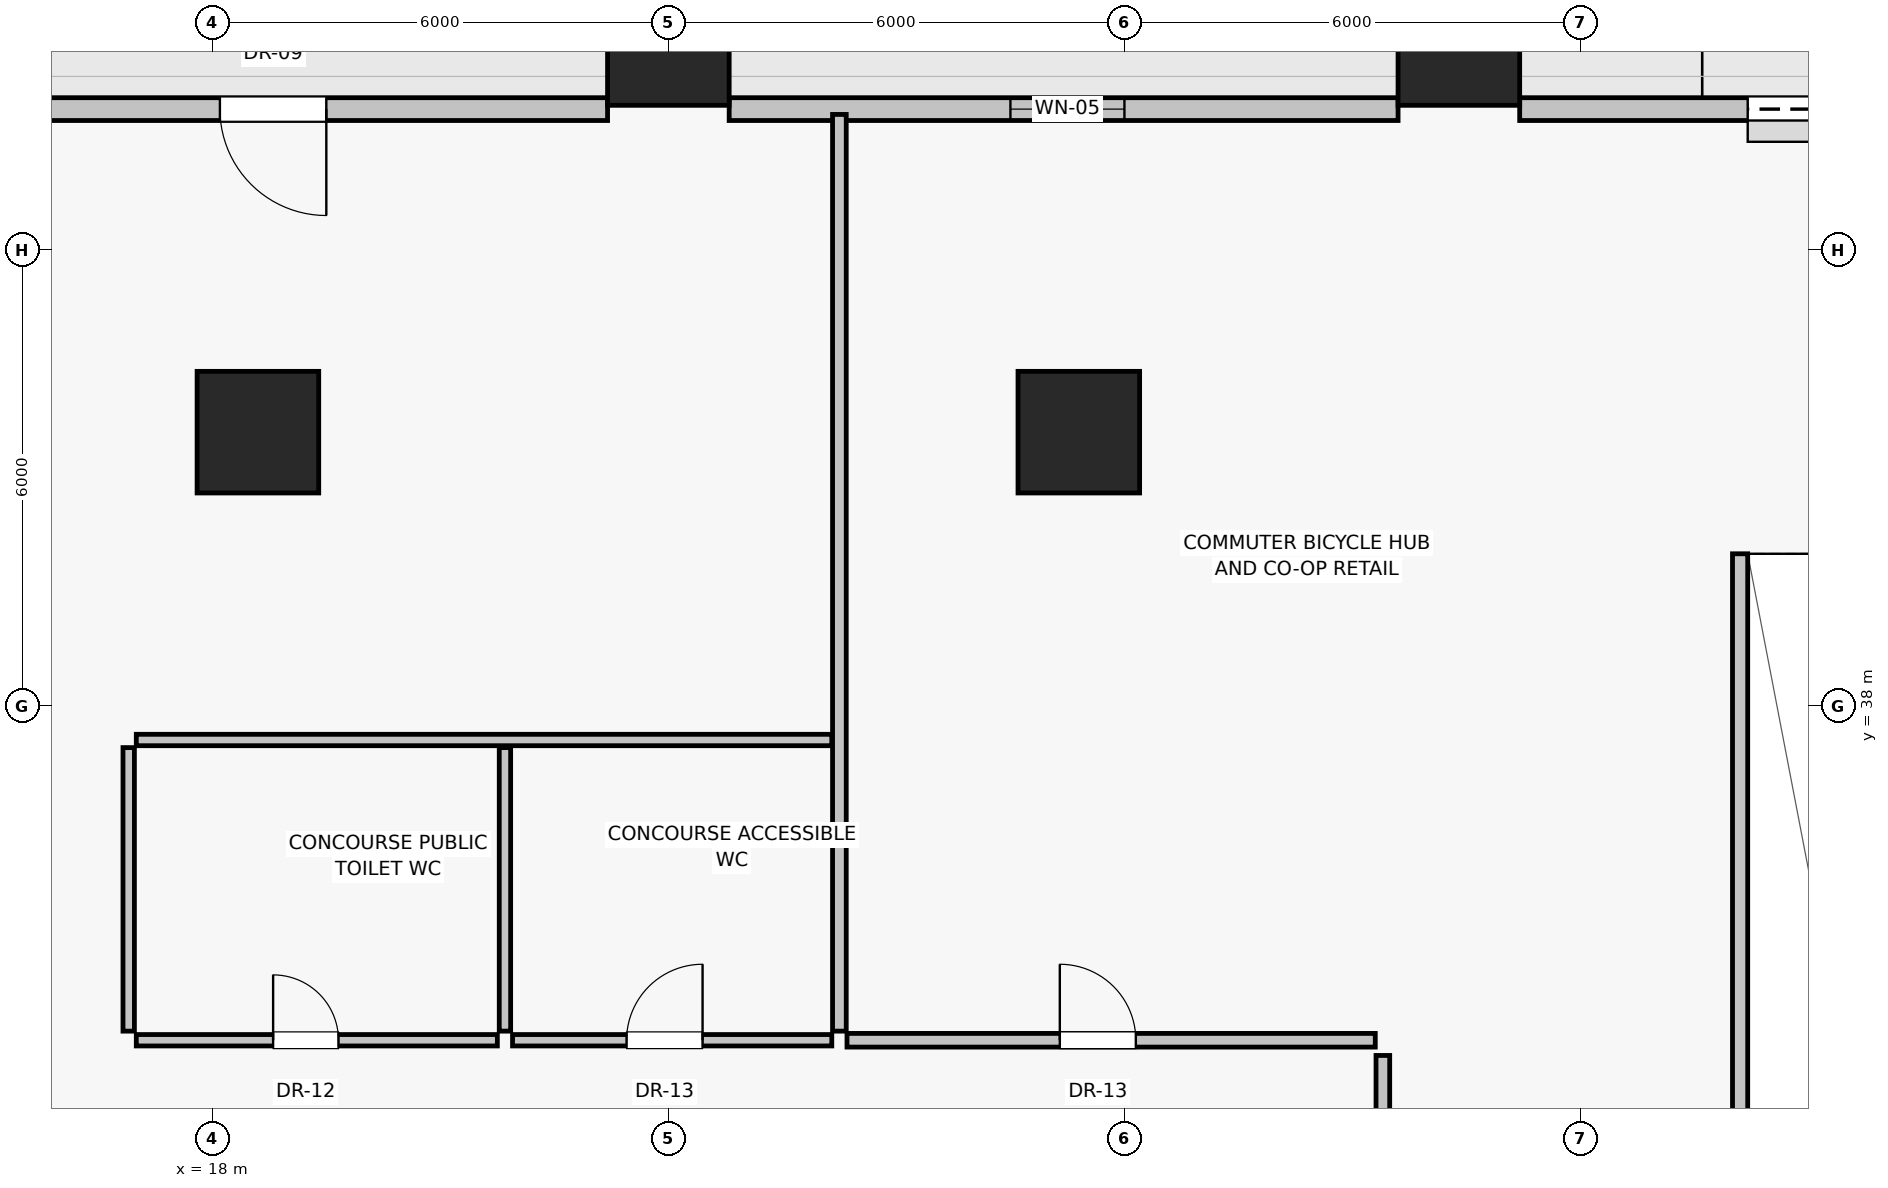
"""IFC4 building model, lengths in metres.
Left out: names, types, materials, properties, quantities, classifications, styles, units other than length and angle.
Written with IfcOpenShell. Run it as: python <this file> out.ifc"""

import sys

from ifc_helpers import new_model, si_unit, direction, frame, frame_2d, origin, origin_2d, place, context, subcontext, project, spatial, rectangle, extrude, source, transform, mapped, element, fill, save


model = new_model("IFC4")
c1 = context("Model", 3, precision=1e-05, world=origin(), true_north=direction((0.0, 1.0)))
c2 = subcontext(c1, "Body", "Model", "MODEL_VIEW")
j1 = project(units=[si_unit("LENGTHUNIT", "METRE"), si_unit("PLANEANGLEUNIT", "RADIAN")], contexts=[c1])
p1 = place(None, origin())
s1 = spatial("IfcSite", under=j1, at=p1, CompositionType="ELEMENT")
p2 = place(p1, origin())
s2 = spatial("IfcBuilding", under=s1, at=p2, CompositionType="ELEMENT")
p3 = place(p2, origin())
s3 = spatial("IfcBuildingStorey", under=s2, at=p3, CompositionType="ELEMENT", Elevation=0.0)
for number, where, z_axis, x_axis in (
    (1, (24.0, 46.7, 0.0), (0.0, 0.0, 1.0), (1.0, 0.0, 0.0)),
    (2, (34.4, 46.7, 0.0), (0.0, 0.0, 1.0), (1.0, 0.0, 0.0)),
    (3, (29.4, 41.6, 0.0), (0.0, 0.0, 1.0), (1.0, 0.0, 0.0)),
    (4, (18.6, 41.6, 0.0), (0.0, 0.0, 1.0), (1.0, 0.0, 0.0)),
):
    element("IfcColumn", number, at=place(p3, frame(where, z_axis=z_axis, x_axis=x_axis)), inside=s3, PredefinedType="COLUMN", context=c2, shape_type="SweptSolid", body=[
        extrude(rectangle(XDim=1.6, YDim=1.6, at=origin_2d()), origin(), (0.0, 0.0, 1.0), 5.2),
    ])
p4 = place(p3, frame((46.0, 45.85, 0.0), z_axis=(0.0, 0.0, 1.0), x_axis=(-1.0, 0.0, 0.0)))
e5 = element("IfcWall", 5, at=p4, inside=s3, PredefinedType="SOLIDWALL", context=c2, shape_type="SweptSolid", body=[
    extrude(rectangle(XDim=10.8, YDim=0.3, at=frame_2d((5.4, 0.0))), origin(), (0.0, 0.0, 1.0), 4.9),
])
p5 = place(p4, frame((1.3, 0.0, 0.0)))
e6 = element("IfcOpeningElement", 6, at=p5, cuts=e5, PredefinedType="OPENING", context=c2, shape_type="SweptSolid", body=[
    extrude(rectangle(XDim=6.5, YDim=4.2, at=frame_2d((3.25, 2.1))), frame((0.0, 0.16, 0.0), z_axis=(0.0, -1.0, 0.0), x_axis=(1.0, 0.0, 0.0)), (0.0, 0.0, 1.0), 0.32),
])
p6 = place(p3, frame((33.6, 45.85, 0.0), z_axis=(0.0, 0.0, 1.0), x_axis=(-1.0, 0.0, 0.0)))
e7 = element("IfcWall", 7, at=p6, inside=s3, PredefinedType="SOLIDWALL", context=c2, shape_type="SweptSolid", body=[
    extrude(rectangle(XDim=8.8, YDim=0.3, at=frame_2d((4.4, 0.0))), origin(), (0.0, 0.0, 1.0), 3.8),
])
p7 = place(p6, frame((3.6, 0.0, 0.85)))
e8 = element("IfcOpeningElement", 8, at=p7, cuts=e7, PredefinedType="OPENING", context=c2, shape_type="SweptSolid", body=[
    extrude(rectangle(XDim=1.5, YDim=1.6, at=frame_2d((0.75, 0.8))), frame((0.0, 0.16, 0.0), z_axis=(0.0, -1.0, 0.0), x_axis=(1.0, 0.0, 0.0)), (0.0, 0.0, 1.0), 0.32),
])
p8 = place(p3, frame((23.2, 45.85, 0.0), z_axis=(0.0, 0.0, 1.0), x_axis=(-1.0, 0.0, 0.0)))
e9 = element("IfcWall", 9, at=p8, inside=s3, PredefinedType="SOLIDWALL", context=c2, shape_type="SweptSolid", body=[
    extrude(rectangle(XDim=8.8, YDim=0.3, at=frame_2d((4.4, 0.0))), origin(), (0.0, 0.0, 1.0), 3.8),
])
p9 = place(p8, frame((3.7, 0.0, 0.0)))
e10 = element("IfcOpeningElement", 10, at=p9, cuts=e9, PredefinedType="OPENING", context=c2, shape_type="SweptSolid", body=[
    extrude(rectangle(XDim=1.4, YDim=2.3, at=frame_2d((0.7, 1.15))), frame((0.0, 0.16, 0.0), z_axis=(0.0, -1.0, 0.0), x_axis=(1.0, 0.0, 0.0)), (0.0, 0.0, 1.0), 0.32),
])
p10 = place(p3, frame((38.1, 6.2, 0.0), z_axis=(0.0, 0.0, 1.0), x_axis=(0.0, 1.0, 0.0)))
e11 = element("IfcWall", 11, at=p10, inside=s3, PredefinedType="SOLIDWALL", context=c2, shape_type="SweptSolid", body=[
    extrude(rectangle(XDim=33.8, YDim=0.2, at=frame_2d((16.9, 0.0))), origin(), (0.0, 0.0, 1.0), 4.9),
])
p11 = place(p3, frame((33.4, 15.4, 0.0), z_axis=(0.0, 0.0, 1.0), x_axis=(0.0, 1.0, 0.0)))
e12 = element("IfcWall", 12, at=p11, inside=s3, PredefinedType="PARTITIONING", context=c2, shape_type="SweptSolid", body=[
    extrude(rectangle(XDim=18.0, YDim=0.18, at=frame_2d((9.0, 0.0))), origin(), (0.0, 0.0, 1.0), 4.9),
])
p12 = place(p11, frame((7.5, 0.0, 0.0)))
e13 = element("IfcOpeningElement", 13, at=p12, cuts=e12, PredefinedType="OPENING", context=c2, shape_type="SweptSolid", body=[
    extrude(rectangle(XDim=1.8, YDim=2.25, at=frame_2d((0.9, 1.125))), frame((0.0, 0.1, 0.0), z_axis=(0.0, -1.0, 0.0), x_axis=(1.0, 0.0, 0.0)), (0.0, 0.0, 1.0), 0.2),
])
p13 = place(p3, frame((17.0, 33.6, 0.0), z_axis=(0.0, 0.0, 1.0), x_axis=(1.0, 0.0, 0.0)))
e14 = element("IfcWall", 14, at=p13, inside=s3, PredefinedType="PARTITIONING", context=c2, shape_type="SweptSolid", body=[
    extrude(rectangle(XDim=4.75, YDim=0.15, at=frame_2d((2.375, 0.0))), origin(), (0.0, 0.0, 1.0), 4.9),
])
p14 = place(p13, frame((1.8, 0.0, 0.0)))
e15 = element("IfcOpeningElement", 15, at=p14, cuts=e14, PredefinedType="OPENING", context=c2, shape_type="SweptSolid", body=[
    extrude(rectangle(XDim=0.86, YDim=2.01, at=frame_2d((0.43, 1.005))), frame((0.0, 0.085, 0.0), z_axis=(0.0, -1.0, 0.0), x_axis=(1.0, 0.0, 0.0)), (0.0, 0.0, 1.0), 0.17),
])
p15 = place(p3, frame((21.95, 33.6, 0.0), z_axis=(0.0, 0.0, 1.0), x_axis=(1.0, 0.0, 0.0)))
e16 = element("IfcWall", 16, at=p15, inside=s3, PredefinedType="PARTITIONING", context=c2, shape_type="SweptSolid", body=[
    extrude(rectangle(XDim=4.2, YDim=0.15, at=frame_2d((2.1, 0.0))), origin(), (0.0, 0.0, 1.0), 4.9),
])
p16 = place(p15, frame((1.5, 0.0, 0.0)))
e17 = element("IfcOpeningElement", 17, at=p16, cuts=e16, PredefinedType="OPENING", context=c2, shape_type="SweptSolid", body=[
    extrude(rectangle(XDim=1.0, YDim=2.01, at=frame_2d((0.5, 1.005))), frame((0.0, 0.085, 0.0), z_axis=(0.0, -1.0, 0.0), x_axis=(1.0, 0.0, 0.0)), (0.0, 0.0, 1.0), 0.17),
])
p17 = place(p3, frame((26.35, 33.6, 0.0), z_axis=(0.0, 0.0, 1.0), x_axis=(1.0, 0.0, 0.0)))
e18 = element("IfcWall", 18, at=p17, inside=s3, PredefinedType="PARTITIONING", context=c2, shape_type="SweptSolid", body=[
    extrude(rectangle(XDim=6.95, YDim=0.18, at=frame_2d((3.475, 0.0))), origin(), (0.0, 0.0, 1.0), 4.9),
])
p18 = place(p17, frame((2.8, 0.0, 0.0)))
e19 = element("IfcOpeningElement", 19, at=p18, cuts=e18, PredefinedType="OPENING", context=c2, shape_type="SweptSolid", body=[
    extrude(rectangle(XDim=1.0, YDim=2.01, at=frame_2d((0.5, 1.005))), frame((0.0, 0.1, 0.0), z_axis=(0.0, -1.0, 0.0), x_axis=(1.0, 0.0, 0.0)), (0.0, 0.0, 1.0), 0.2),
])
for number, where, z_axis, x_axis in (
    (20, (16.9, 33.72, 0.0), (0.0, 0.0, 1.0), (0.0, 1.0, 0.0)),
    (21, (21.85, 33.72, 0.0), (0.0, 0.0, 1.0), (0.0, 1.0, 0.0)),
):
    element("IfcWall", number, at=place(p3, frame(where, z_axis=z_axis, x_axis=x_axis)), inside=s3, PredefinedType="PARTITIONING", context=c2, shape_type="SweptSolid", body=[
        extrude(rectangle(XDim=3.73, YDim=0.15, at=frame_2d((1.865, 0.0))), origin(), (0.0, 0.0, 1.0), 4.9),
    ])
p19 = place(p3, frame((26.25, 33.72, 0.0), z_axis=(0.0, 0.0, 1.0), x_axis=(0.0, 1.0, 0.0)))
e22 = element("IfcWall", 22, at=p19, inside=s3, PredefinedType="PARTITIONING", context=c2, shape_type="SweptSolid", body=[
    extrude(rectangle(XDim=12.06, YDim=0.18, at=frame_2d((6.03, 0.0))), origin(), (0.0, 0.0, 1.0), 4.9),
])
p20 = place(p3, frame((17.0, 37.55, 0.0), z_axis=(0.0, 0.0, 1.0), x_axis=(1.0, 0.0, 0.0)))
e23 = element("IfcWall", 23, at=p20, inside=s3, PredefinedType="PARTITIONING", context=c2, shape_type="SweptSolid", body=[
    extrude(rectangle(XDim=9.15, YDim=0.15, at=frame_2d((4.575, 0.0))), origin(), (0.0, 0.0, 1.0), 4.9),
])
m1 = source(origin(), c2, "Body", "SweptSolid", [
    extrude(rectangle(XDim=6.5, YDim=4.2, at=frame_2d((3.25, 2.1))), frame((0.0, 0.025, 0.0), z_axis=(0.0, -1.0, 0.0), x_axis=(1.0, 0.0, 0.0)), (0.0, 0.0, 1.0), 0.05),
])
p21 = place(p5, origin())
e24 = element("IfcDoor", 24, at=p21, inside=s3, OperationType="ROLLINGUP", PredefinedType="GATE", context=c2, shape_type="MappedRepresentation", body=[
    mapped(m1, transform((0.0, 0.0, 0.0), scale=1.0)),
])
fill(e6, e24)
m2 = source(origin(), c2, "Body", "SweptSolid", [
    extrude(rectangle(XDim=1.5, YDim=1.6, at=frame_2d((0.75, 0.8))), frame((0.0, 0.03, 0.0), z_axis=(0.0, -1.0, 0.0), x_axis=(1.0, 0.0, 0.0)), (0.0, 0.0, 1.0), 0.06),
])
p22 = place(p7, origin())
e25 = element("IfcWindow", 25, at=p22, inside=s3, PartitioningType="DOUBLE_PANEL_VERTICAL", PredefinedType="WINDOW", context=c2, shape_type="MappedRepresentation", body=[
    mapped(m2, transform((0.0, 0.0, 0.0), scale=1.0)),
])
fill(e8, e25)
m3 = source(origin(), c2, "Body", "SweptSolid", [
    extrude(rectangle(XDim=1.4, YDim=2.3, at=frame_2d((0.7, 1.15))), frame((0.0, 0.025, 0.0), z_axis=(0.0, -1.0, 0.0), x_axis=(1.0, 0.0, 0.0)), (0.0, 0.0, 1.0), 0.05),
])
p23 = place(p9, frame((1.4, 0.0, 0.0), z_axis=(0.0, 0.0, 1.0), x_axis=(-1.0, 0.0, 0.0)))
e26 = element("IfcDoor", 26, at=p23, inside=s3, OperationType="SINGLE_SWING_LEFT", PredefinedType="DOOR", context=c2, shape_type="MappedRepresentation", body=[
    mapped(m3, transform((0.0, 0.0, 0.0), scale=1.0)),
])
fill(e10, e26)
m4 = source(origin(), c2, "Body", "SweptSolid", [
    extrude(rectangle(XDim=0.86, YDim=2.01, at=frame_2d((0.43, 1.005))), frame((0.0, 0.025, 0.0), z_axis=(0.0, -1.0, 0.0), x_axis=(1.0, 0.0, 0.0)), (0.0, 0.0, 1.0), 0.05),
])
p24 = place(p14, origin())
e27 = element("IfcDoor", 27, at=p24, inside=s3, OperationType="SINGLE_SWING_LEFT", PredefinedType="DOOR", context=c2, shape_type="MappedRepresentation", body=[
    mapped(m4, transform((0.0, 0.0, 0.0), scale=1.0)),
])
fill(e15, e27)
m5 = source(origin(), c2, "Body", "SweptSolid", [
    extrude(rectangle(XDim=1.0, YDim=2.01, at=frame_2d((0.5, 1.005))), frame((0.0, 0.025, 0.0), z_axis=(0.0, -1.0, 0.0), x_axis=(1.0, 0.0, 0.0)), (0.0, 0.0, 1.0), 0.05),
])
p25 = place(p16, origin())
e28 = element("IfcDoor", 28, at=p25, inside=s3, OperationType="SINGLE_SWING_RIGHT", PredefinedType="DOOR", context=c2, shape_type="MappedRepresentation", body=[
    mapped(m5, transform((0.0, 0.0, 0.0), scale=1.0)),
])
fill(e17, e28)
p26 = place(p18, origin())
e29 = element("IfcDoor", 29, at=p26, inside=s3, OperationType="SINGLE_SWING_LEFT", PredefinedType="DOOR", context=c2, shape_type="MappedRepresentation", body=[
    mapped(m5, transform((0.0, 0.0, 0.0), scale=1.0)),
])
fill(e19, e29)
save(model, sys.argv[1])
